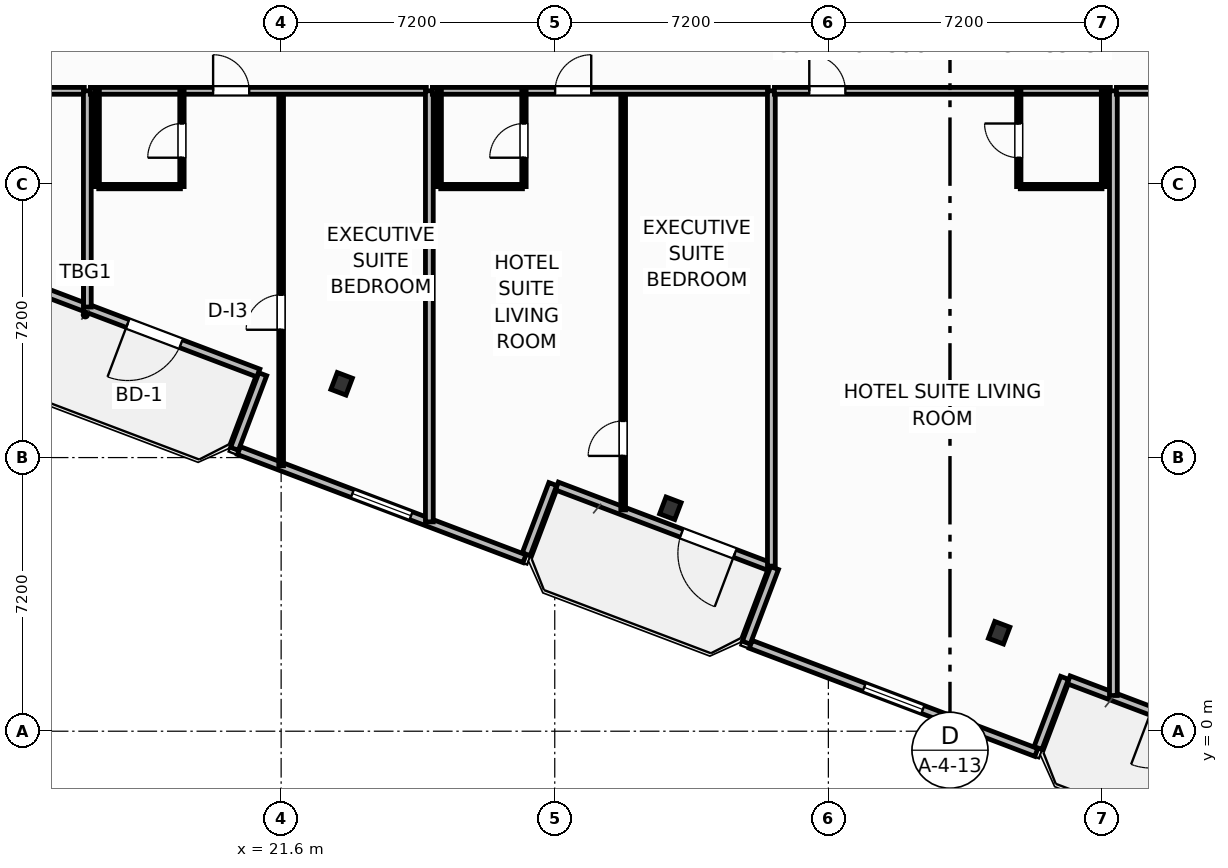
"""IFC4 building model, lengths in metres.
Left out: names, types, materials, properties, quantities, classifications, styles, units other than length and angle.
Written with IfcOpenShell. Run it as: python <this file> out.ifc"""

import sys

from ifc_helpers import new_model, si_unit, direction, frame, frame_2d, origin, origin_2d, place, context, subcontext, project, spatial, rectangle, i_section, extrude, element, fill, save


model = new_model("IFC4")
c1 = context("Model", 3, precision=1e-05, world=origin(), true_north=direction((0.0, 1.0)))
c2 = subcontext(c1, "Body", "Model", "MODEL_VIEW")
j1 = project(units=[si_unit("LENGTHUNIT", "METRE"), si_unit("PLANEANGLEUNIT", "RADIAN")], contexts=[c1])
p1 = place(None, origin())
s1 = spatial("IfcSite", under=j1, at=p1, CompositionType="ELEMENT")
p2 = place(p1, origin())
s2 = spatial("IfcBuilding", under=s1, at=p2, CompositionType="ELEMENT")
p3 = place(p2, frame((0.0, 0.0, 83.6)))
s3 = spatial("IfcBuildingStorey", under=s2, at=p3, CompositionType="ELEMENT", Elevation=83.6)
for number, where, z_axis, x_axis in (
    (1, (23.192, 9.141, 0.0), (0.0, 0.0, 1.0), (0.935, -0.354, 0.0)),
    (2, (31.843, 5.866, 0.0), (0.0, 0.0, 1.0), (0.935, -0.354, 0.0)),
    (3, (40.493, 2.591, 0.0), (0.0, 0.0, 1.0), (0.935, -0.354, 0.0)),
):
    element("IfcColumn", number, at=place(p3, frame(where, z_axis=z_axis, x_axis=x_axis)), inside=s3, PredefinedType="COLUMN", context=c2, shape_type="SweptSolid", body=[
        extrude(i_section(OverallWidth=0.424, OverallDepth=0.474, WebThickness=0.048, FlangeThickness=0.077, FilletRadius=0.025, at=origin_2d()), origin(), (0.0, 0.0, 1.0), 3.7),
    ])
p4 = place(p3, frame((21.0, 9.425, 0.0), z_axis=(0.0, 0.0, 1.0), x_axis=(-0.93521416643, 0.354082565101, 0.0)))
e4 = element("IfcWall", 4, at=p4, inside=s3, PredefinedType="SOLIDWALL", context=c2, shape_type="SweptSolid", body=[
    extrude(rectangle(XDim=6.0, YDim=0.22, at=frame_2d((3.0, 0.0))), origin(), (0.0, 0.0, 1.0), 2.73),
])
p5 = place(p4, frame((2.176, 0.0, 0.0)))
e5 = element("IfcOpeningElement", 5, at=p5, cuts=e4, PredefinedType="OPENING", context=c2, shape_type="SweptSolid", body=[
    extrude(rectangle(XDim=1.5, YDim=2.25, at=frame_2d((0.75, 1.125))), frame((0.0, 0.12, 0.0), z_axis=(0.0, -1.0, 0.0), x_axis=(1.0, 0.0, 0.0)), (0.0, 0.0, 1.0), 0.24),
])
p6 = place(p3, frame((34.468, 4.327, 0.0), z_axis=(0.0, 0.0, 1.0), x_axis=(-0.9352192676, 0.354069091436, 0.0)))
e6 = element("IfcWall", 6, at=p6, inside=s3, PredefinedType="SOLIDWALL", context=c2, shape_type="SweptSolid", body=[
    extrude(rectangle(XDim=6.0, YDim=0.22, at=frame_2d((3.0, 0.0))), origin(), (0.0, 0.0, 1.0), 2.73),
])
p7 = place(p6, frame((0.992, 0.0, 0.0)))
e7 = element("IfcOpeningElement", 7, at=p7, cuts=e6, PredefinedType="OPENING", context=c2, shape_type="SweptSolid", body=[
    extrude(rectangle(XDim=1.5, YDim=2.25, at=frame_2d((0.75, 1.125))), frame((0.0, 0.12, 0.0), z_axis=(0.0, -1.0, 0.0), x_axis=(1.0, 0.0, 0.0)), (0.0, 0.0, 1.0), 0.24),
])
p8 = place(p3, frame((47.935, -0.771, 0.0), z_axis=(0.0, 0.0, 1.0), x_axis=(-0.935227640088, 0.354046976001, 0.0)))
e8 = element("IfcWall", 8, at=p8, inside=s3, PredefinedType="SOLIDWALL", context=c2, shape_type="SweptSolid", body=[
    extrude(rectangle(XDim=6.0, YDim=0.22, at=frame_2d((3.0, 0.0))), origin(), (0.0, 0.0, 1.0), 2.73),
])
p9 = place(p8, frame((2.176, 0.0, 0.0)))
e9 = element("IfcOpeningElement", 9, at=p9, cuts=e8, PredefinedType="OPENING", context=c2, shape_type="SweptSolid", body=[
    extrude(rectangle(XDim=1.5, YDim=2.25, at=frame_2d((0.75, 1.125))), frame((0.0, 0.12, 0.0), z_axis=(0.0, -1.0, 0.0), x_axis=(1.0, 0.0, 0.0)), (0.0, 0.0, 1.0), 0.24),
])
p10 = place(p3, frame((21.116, 9.392, 0.0), z_axis=(0.0, 0.0, 1.0), x_axis=(-0.353988291547, -0.935249854022, 0.0)))
e10 = element("IfcWall", 10, at=p10, inside=s3, PredefinedType="SOLIDWALL", context=c2, shape_type="SweptSolid", body=[
    extrude(rectangle(XDim=2.1, YDim=0.22, at=frame_2d((1.05, 0.0))), origin(), (0.0, 0.0, 1.0), 2.73),
])
p11 = place(p3, frame((20.49, 7.384, 0.0), z_axis=(0.0, 0.0, 1.0), x_axis=(0.935230796934, -0.354038636968, 0.0)))
e11 = element("IfcWall", 11, at=p11, inside=s3, PredefinedType="SOLIDWALL", context=c2, shape_type="SweptSolid", body=[
    extrude(rectangle(XDim=8.035, YDim=0.22, at=frame_2d((4.018, 0.0))), origin(), (0.0, 0.0, 1.0), 2.73),
])
p12 = place(p11, frame((3.192, 0.0, 0.8)))
e12 = element("IfcOpeningElement", 12, at=p12, cuts=e11, PredefinedType="OPENING", context=c2, shape_type="SweptSolid", body=[
    extrude(rectangle(XDim=1.65, YDim=1.65, at=frame_2d((0.825, 0.825))), frame((0.0, 0.12, 0.0), z_axis=(0.0, -1.0, 0.0), x_axis=(1.0, 0.0, 0.0)), (0.0, 0.0, 1.0), 0.24),
])
p13 = place(p3, frame((28.048, 4.656, 0.0), z_axis=(0.0, 0.0, 1.0), x_axis=(0.354128791944, 0.935196663123, 0.0)))
e13 = element("IfcWall", 13, at=p13, inside=s3, PredefinedType="SOLIDWALL", context=c2, shape_type="SweptSolid", body=[
    extrude(rectangle(XDim=1.975, YDim=0.22, at=frame_2d((0.988, 0.0))), origin(), (0.0, 0.0, 1.0), 2.73),
])
p14 = place(p3, frame((34.583, 4.294, 0.0), z_axis=(0.0, 0.0, 1.0), x_axis=(-0.354128469405, -0.935196785258, 0.0)))
e14 = element("IfcWall", 14, at=p14, inside=s3, PredefinedType="SOLIDWALL", context=c2, shape_type="SweptSolid", body=[
    extrude(rectangle(XDim=2.1, YDim=0.22, at=frame_2d((1.05, 0.0))), origin(), (0.0, 0.0, 1.0), 2.73),
])
p15 = place(p3, frame((33.957, 2.286, 0.0), z_axis=(0.0, 0.0, 1.0), x_axis=(0.935220736163, -0.354065212427, 0.0)))
e15 = element("IfcWall", 15, at=p15, inside=s3, PredefinedType="SOLIDWALL", context=c2, shape_type="SweptSolid", body=[
    extrude(rectangle(XDim=8.035, YDim=0.22, at=frame_2d((4.018, 0.0))), origin(), (0.0, 0.0, 1.0), 2.73),
])
p16 = place(p15, frame((3.192, 0.0, 0.8)))
e16 = element("IfcOpeningElement", 16, at=p16, cuts=e15, PredefinedType="OPENING", context=c2, shape_type="SweptSolid", body=[
    extrude(rectangle(XDim=1.65, YDim=1.65, at=frame_2d((0.825, 0.825))), frame((0.0, 0.12, 0.0), z_axis=(0.0, -1.0, 0.0), x_axis=(1.0, 0.0, 0.0)), (0.0, 0.0, 1.0), 0.24),
])
p17 = place(p3, frame((41.516, -0.442, 0.0), z_axis=(0.0, 0.0, 1.0), x_axis=(0.354061611705, 0.935222099352, 0.0)))
e17 = element("IfcWall", 17, at=p17, inside=s3, PredefinedType="SOLIDWALL", context=c2, shape_type="SweptSolid", body=[
    extrude(rectangle(XDim=1.975, YDim=0.22, at=frame_2d((0.987, 0.0))), origin(), (0.0, 0.0, 1.0), 2.73),
])
p18 = place(p3, frame((1.58, 16.85, 0.0), z_axis=(0.0, 0.0, 1.0), x_axis=(1.0, 0.0, 0.0)))
e18 = element("IfcWall", 18, at=p18, inside=s3, PredefinedType="PARTITIONING", context=c2, shape_type="SweptSolid", body=[
    extrude(rectangle(XDim=14.84, YDim=0.18, at=frame_2d((7.42, 0.0))), origin(), (0.0, 0.0, 1.0), 3.45),
])
p19 = place(p18, frame((11.705, 0.0, 0.0)))
e19 = element("IfcOpeningElement", 19, at=p19, cuts=e18, PredefinedType="OPENING", context=c2, shape_type="SweptSolid", body=[
    extrude(rectangle(XDim=0.95, YDim=2.15, at=frame_2d((0.475, 1.075))), frame((0.0, 0.1, 0.0), z_axis=(0.0, -1.0, 0.0), x_axis=(1.0, 0.0, 0.0)), (0.0, 0.0, 1.0), 0.2),
])
p20 = place(p3, frame((16.5, 11.161, 0.0), z_axis=(0.0, 0.0, 1.0), x_axis=(0.0, 1.0, 0.0)))
e20 = element("IfcWall", 20, at=p20, inside=s3, PredefinedType="PARTITIONING", context=c2, shape_type="SweptSolid", body=[
    extrude(rectangle(XDim=5.689, YDim=0.205, at=frame_2d((2.844, 0.0))), origin(), (0.0, 0.0, 1.0), 3.45),
])
p21 = place(p3, frame((21.6, 6.985, 0.0), z_axis=(0.0, 0.0, 1.0), x_axis=(0.0, 1.0, 0.0)))
e21 = element("IfcWall", 21, at=p21, inside=s3, PredefinedType="PARTITIONING", context=c2, shape_type="SweptSolid", body=[
    extrude(rectangle(XDim=9.865, YDim=0.125, at=frame_2d((4.933, 0.0))), origin(), (0.0, 0.0, 1.0), 3.45),
])
p22 = place(p21, frame((3.578, 0.0, 0.0)))
e22 = element("IfcOpeningElement", 22, at=p22, cuts=e21, PredefinedType="OPENING", context=c2, shape_type="SweptSolid", body=[
    extrude(rectangle(XDim=0.92, YDim=2.05, at=frame_2d((0.46, 1.025))), frame((0.0, 0.073, 0.0), z_axis=(0.0, -1.0, 0.0), x_axis=(1.0, 0.0, 0.0)), (0.0, 0.0, 1.0), 0.145),
])
p23 = place(p3, frame((16.58, 16.85, 0.0), z_axis=(0.0, 0.0, 1.0), x_axis=(1.0, 0.0, 0.0)))
e23 = element("IfcWall", 23, at=p23, inside=s3, PredefinedType="PARTITIONING", context=c2, shape_type="SweptSolid", body=[
    extrude(rectangle(XDim=8.84, YDim=0.18, at=frame_2d((4.42, 0.0))), origin(), (0.0, 0.0, 1.0), 3.45),
])
p24 = place(p23, frame((3.23, 0.0, 0.0)))
e24 = element("IfcOpeningElement", 24, at=p24, cuts=e23, PredefinedType="OPENING", context=c2, shape_type="SweptSolid", body=[
    extrude(rectangle(XDim=0.95, YDim=2.15, at=frame_2d((0.475, 1.075))), frame((0.0, 0.1, 0.0), z_axis=(0.0, -1.0, 0.0), x_axis=(1.0, 0.0, 0.0)), (0.0, 0.0, 1.0), 0.2),
])
p25 = place(p3, frame((16.8, 14.33, 0.0), z_axis=(0.0, 0.0, 1.0), x_axis=(1.0, 0.0, 0.0)))
e25 = element("IfcWall", 25, at=p25, inside=s3, PredefinedType="PARTITIONING", context=c2, shape_type="SweptSolid", body=[
    extrude(rectangle(XDim=2.15, YDim=0.115, at=frame_2d((1.075, 0.0))), origin(), (0.0, 0.0, 1.0), 3.45),
])
p26 = place(p3, frame((18.99, 14.33, 0.0), z_axis=(0.0, 0.0, 1.0), x_axis=(0.0, 1.0, 0.0)))
e26 = element("IfcWall", 26, at=p26, inside=s3, PredefinedType="PARTITIONING", context=c2, shape_type="SweptSolid", body=[
    extrude(rectangle(XDim=2.52, YDim=0.115, at=frame_2d((1.26, 0.0))), origin(), (0.0, 0.0, 1.0), 3.45),
])
p27 = place(p26, frame((0.76, 0.0, 0.0)))
e27 = element("IfcOpeningElement", 27, at=p27, cuts=e26, PredefinedType="OPENING", context=c2, shape_type="SweptSolid", body=[
    extrude(rectangle(XDim=0.9, YDim=2.05, at=frame_2d((0.45, 1.025))), frame((0.0, 0.067, 0.0), z_axis=(0.0, -1.0, 0.0), x_axis=(1.0, 0.0, 0.0)), (0.0, 0.0, 1.0), 0.135),
])
p28 = place(p3, frame((16.76, 14.33, 0.0), z_axis=(0.0, 0.0, 1.0), x_axis=(0.0, 1.0, 0.0)))
e28 = element("IfcWall", 28, at=p28, inside=s3, PredefinedType="PARTITIONING", context=c2, shape_type="SweptSolid", body=[
    extrude(rectangle(XDim=2.52, YDim=0.115, at=frame_2d((1.26, 0.0))), origin(), (0.0, 0.0, 1.0), 3.45),
])
p29 = place(p3, frame((25.5, 5.509, 0.0), z_axis=(0.0, 0.0, 1.0), x_axis=(0.0, 1.0, 0.0)))
e29 = element("IfcWall", 29, at=p29, inside=s3, PredefinedType="PARTITIONING", context=c2, shape_type="SweptSolid", body=[
    extrude(rectangle(XDim=11.342, YDim=0.205, at=frame_2d((5.671, 0.0))), origin(), (0.0, 0.0, 1.0), 3.45),
])
p30 = place(p3, frame((30.6, 5.823, 0.0), z_axis=(0.0, 0.0, 1.0), x_axis=(0.0, 1.0, 0.0)))
e30 = element("IfcWall", 30, at=p30, inside=s3, PredefinedType="PARTITIONING", context=c2, shape_type="SweptSolid", body=[
    extrude(rectangle(XDim=11.027, YDim=0.125, at=frame_2d((5.513, 0.0))), origin(), (0.0, 0.0, 1.0), 3.45),
])
p31 = place(p30, frame((1.42, 0.0, 0.0)))
e31 = element("IfcOpeningElement", 31, at=p31, cuts=e30, PredefinedType="OPENING", context=c2, shape_type="SweptSolid", body=[
    extrude(rectangle(XDim=0.92, YDim=2.05, at=frame_2d((0.46, 1.025))), frame((0.0, 0.073, 0.0), z_axis=(0.0, -1.0, 0.0), x_axis=(1.0, 0.0, 0.0)), (0.0, 0.0, 1.0), 0.145),
])
p32 = place(p3, frame((25.58, 16.85, 0.0), z_axis=(0.0, 0.0, 1.0), x_axis=(1.0, 0.0, 0.0)))
e32 = element("IfcWall", 32, at=p32, inside=s3, PredefinedType="PARTITIONING", context=c2, shape_type="SweptSolid", body=[
    extrude(rectangle(XDim=8.84, YDim=0.18, at=frame_2d((4.42, 0.0))), origin(), (0.0, 0.0, 1.0), 3.45),
])
p33 = place(p32, frame((3.23, 0.0, 0.0)))
e33 = element("IfcOpeningElement", 33, at=p33, cuts=e32, PredefinedType="OPENING", context=c2, shape_type="SweptSolid", body=[
    extrude(rectangle(XDim=0.95, YDim=2.15, at=frame_2d((0.475, 1.075))), frame((0.0, 0.1, 0.0), z_axis=(0.0, -1.0, 0.0), x_axis=(1.0, 0.0, 0.0)), (0.0, 0.0, 1.0), 0.2),
])
p34 = place(p3, frame((25.8, 14.33, 0.0), z_axis=(0.0, 0.0, 1.0), x_axis=(1.0, 0.0, 0.0)))
e34 = element("IfcWall", 34, at=p34, inside=s3, PredefinedType="PARTITIONING", context=c2, shape_type="SweptSolid", body=[
    extrude(rectangle(XDim=2.15, YDim=0.115, at=frame_2d((1.075, 0.0))), origin(), (0.0, 0.0, 1.0), 3.45),
])
p35 = place(p3, frame((27.99, 14.33, 0.0), z_axis=(0.0, 0.0, 1.0), x_axis=(0.0, 1.0, 0.0)))
e35 = element("IfcWall", 35, at=p35, inside=s3, PredefinedType="PARTITIONING", context=c2, shape_type="SweptSolid", body=[
    extrude(rectangle(XDim=2.52, YDim=0.115, at=frame_2d((1.26, 0.0))), origin(), (0.0, 0.0, 1.0), 3.45),
])
p36 = place(p35, frame((0.76, 0.0, 0.0)))
e36 = element("IfcOpeningElement", 36, at=p36, cuts=e35, PredefinedType="OPENING", context=c2, shape_type="SweptSolid", body=[
    extrude(rectangle(XDim=0.9, YDim=2.05, at=frame_2d((0.45, 1.025))), frame((0.0, 0.067, 0.0), z_axis=(0.0, -1.0, 0.0), x_axis=(1.0, 0.0, 0.0)), (0.0, 0.0, 1.0), 0.135),
])
p37 = place(p3, frame((25.76, 14.33, 0.0), z_axis=(0.0, 0.0, 1.0), x_axis=(0.0, 1.0, 0.0)))
e37 = element("IfcWall", 37, at=p37, inside=s3, PredefinedType="PARTITIONING", context=c2, shape_type="SweptSolid", body=[
    extrude(rectangle(XDim=2.52, YDim=0.115, at=frame_2d((1.26, 0.0))), origin(), (0.0, 0.0, 1.0), 3.45),
])
p38 = place(p3, frame((34.5, 4.344, 0.0), z_axis=(0.0, 0.0, 1.0), x_axis=(0.0, 1.0, 0.0)))
e38 = element("IfcWall", 38, at=p38, inside=s3, PredefinedType="PARTITIONING", context=c2, shape_type="SweptSolid", body=[
    extrude(rectangle(XDim=12.506, YDim=0.205, at=frame_2d((6.253, 0.0))), origin(), (0.0, 0.0, 1.0), 3.45),
])
p39 = place(p3, frame((34.58, 16.85, 0.0), z_axis=(0.0, 0.0, 1.0), x_axis=(1.0, 0.0, 0.0)))
e39 = element("IfcWall", 39, at=p39, inside=s3, PredefinedType="PARTITIONING", context=c2, shape_type="SweptSolid", body=[
    extrude(rectangle(XDim=8.84, YDim=0.18, at=frame_2d((4.42, 0.0))), origin(), (0.0, 0.0, 1.0), 3.45),
])
p40 = place(p39, frame((0.918, 0.0, 0.0)))
e40 = element("IfcOpeningElement", 40, at=p40, cuts=e39, PredefinedType="OPENING", context=c2, shape_type="SweptSolid", body=[
    extrude(rectangle(XDim=0.95, YDim=2.15, at=frame_2d((0.475, 1.075))), frame((0.0, 0.1, 0.0), z_axis=(0.0, -1.0, 0.0), x_axis=(1.0, 0.0, 0.0)), (0.0, 0.0, 1.0), 0.2),
])
p41 = place(p3, frame((41.05, 14.33, 0.0), z_axis=(0.0, 0.0, 1.0), x_axis=(1.0, 0.0, 0.0)))
e41 = element("IfcWall", 41, at=p41, inside=s3, PredefinedType="PARTITIONING", context=c2, shape_type="SweptSolid", body=[
    extrude(rectangle(XDim=2.15, YDim=0.115, at=frame_2d((1.075, 0.0))), origin(), (0.0, 0.0, 1.0), 3.45),
])
p42 = place(p3, frame((41.01, 14.33, 0.0), z_axis=(0.0, 0.0, 1.0), x_axis=(0.0, 1.0, 0.0)))
e42 = element("IfcWall", 42, at=p42, inside=s3, PredefinedType="PARTITIONING", context=c2, shape_type="SweptSolid", body=[
    extrude(rectangle(XDim=2.52, YDim=0.115, at=frame_2d((1.26, 0.0))), origin(), (0.0, 0.0, 1.0), 3.45),
])
p43 = place(p42, frame((0.76, 0.0, 0.0)))
e43 = element("IfcOpeningElement", 43, at=p43, cuts=e42, PredefinedType="OPENING", context=c2, shape_type="SweptSolid", body=[
    extrude(rectangle(XDim=0.9, YDim=2.05, at=frame_2d((0.45, 1.025))), frame((0.0, 0.067, 0.0), z_axis=(0.0, -1.0, 0.0), x_axis=(1.0, 0.0, 0.0)), (0.0, 0.0, 1.0), 0.135),
])
p44 = place(p3, frame((43.24, 14.33, 0.0), z_axis=(0.0, 0.0, 1.0), x_axis=(0.0, 1.0, 0.0)))
e44 = element("IfcWall", 44, at=p44, inside=s3, PredefinedType="PARTITIONING", context=c2, shape_type="SweptSolid", body=[
    extrude(rectangle(XDim=2.52, YDim=0.115, at=frame_2d((1.26, 0.0))), origin(), (0.0, 0.0, 1.0), 2.58),
])
p45 = place(p3, frame((43.5, 0.939, 0.0), z_axis=(0.0, 0.0, 1.0), x_axis=(0.0, 1.0, 0.0)))
e45 = element("IfcWall", 45, at=p45, inside=s3, PredefinedType="PARTITIONING", context=c2, shape_type="SweptSolid", body=[
    extrude(rectangle(XDim=15.911, YDim=0.205, at=frame_2d((7.955, 0.0))), origin(), (0.0, 0.0, 1.0), 2.58),
])
p46 = place(p3, frame((43.58, 16.85, 0.0), z_axis=(0.0, 0.0, 1.0), x_axis=(1.0, 0.0, 0.0)))
e46 = element("IfcWall", 46, at=p46, inside=s3, PredefinedType="PARTITIONING", context=c2, shape_type="SweptSolid", body=[
    extrude(rectangle(XDim=8.84, YDim=0.18, at=frame_2d((4.42, 0.0))), origin(), (0.0, 0.0, 1.0), 3.45),
])
p47 = place(p46, frame((0.918, 0.0, 0.0)))
e47 = element("IfcOpeningElement", 47, at=p47, cuts=e46, PredefinedType="OPENING", context=c2, shape_type="SweptSolid", body=[
    extrude(rectangle(XDim=0.95, YDim=2.15, at=frame_2d((0.475, 1.075))), frame((0.0, 0.1, 0.0), z_axis=(0.0, -1.0, 0.0), x_axis=(1.0, 0.0, 0.0)), (0.0, 0.0, 1.0), 0.2),
])
p48 = place(p5, origin())
e48 = element("IfcDoor", 48, at=p48, inside=s3, OperationType="SINGLE_SWING_RIGHT", PredefinedType="DOOR", context=c2, shape_type="SweptSolid", body=[
    extrude(rectangle(XDim=1.5, YDim=2.25, at=frame_2d((0.75, 1.125))), frame((0.0, 0.025, 0.0), z_axis=(0.0, -1.0, 0.0), x_axis=(1.0, 0.0, 0.0)), (0.0, 0.0, 1.0), 0.05),
])
fill(e5, e48)
p49 = place(p7, origin())
e49 = element("IfcDoor", 49, at=p49, inside=s3, OperationType="SINGLE_SWING_LEFT", PredefinedType="DOOR", context=c2, shape_type="SweptSolid", body=[
    extrude(rectangle(XDim=1.5, YDim=2.25, at=frame_2d((0.75, 1.125))), frame((0.0, 0.025, 0.0), z_axis=(0.0, -1.0, 0.0), x_axis=(1.0, 0.0, 0.0)), (0.0, 0.0, 1.0), 0.05),
])
fill(e7, e49)
p50 = place(p12, origin())
e50 = element("IfcWindow", 50, at=p50, inside=s3, PartitioningType="SINGLE_PANEL", PredefinedType="WINDOW", context=c2, shape_type="SweptSolid", body=[
    extrude(rectangle(XDim=1.65, YDim=1.65, at=frame_2d((0.825, 0.825))), frame((0.0, 0.03, 0.0), z_axis=(0.0, -1.0, 0.0), x_axis=(1.0, 0.0, 0.0)), (0.0, 0.0, 1.0), 0.06),
])
fill(e12, e50)
p51 = place(p16, origin())
e51 = element("IfcWindow", 51, at=p51, inside=s3, PartitioningType="SINGLE_PANEL", PredefinedType="WINDOW", context=c2, shape_type="SweptSolid", body=[
    extrude(rectangle(XDim=1.65, YDim=1.65, at=frame_2d((0.825, 0.825))), frame((0.0, 0.03, 0.0), z_axis=(0.0, -1.0, 0.0), x_axis=(1.0, 0.0, 0.0)), (0.0, 0.0, 1.0), 0.06),
])
fill(e16, e51)
p52 = place(p22, origin())
e52 = element("IfcDoor", 52, at=p52, inside=s3, OperationType="SINGLE_SWING_LEFT", PredefinedType="DOOR", context=c2, shape_type="SweptSolid", body=[
    extrude(rectangle(XDim=0.92, YDim=2.05, at=frame_2d((0.46, 1.025))), frame((0.0, 0.025, 0.0), z_axis=(0.0, -1.0, 0.0), x_axis=(1.0, 0.0, 0.0)), (0.0, 0.0, 1.0), 0.05),
])
fill(e22, e52)
p53 = place(p24, origin())
e53 = element("IfcDoor", 53, at=p53, inside=s3, OperationType="SINGLE_SWING_LEFT", PredefinedType="DOOR", context=c2, shape_type="SweptSolid", body=[
    extrude(rectangle(XDim=0.95, YDim=2.15, at=frame_2d((0.475, 1.075))), frame((0.0, 0.025, 0.0), z_axis=(0.0, -1.0, 0.0), x_axis=(1.0, 0.0, 0.0)), (0.0, 0.0, 1.0), 0.05),
])
fill(e24, e53)
p54 = place(p27, origin())
e54 = element("IfcDoor", 54, at=p54, inside=s3, OperationType="SINGLE_SWING_LEFT", PredefinedType="DOOR", context=c2, shape_type="SweptSolid", body=[
    extrude(rectangle(XDim=0.9, YDim=2.05, at=frame_2d((0.45, 1.025))), frame((0.0, 0.025, 0.0), z_axis=(0.0, -1.0, 0.0), x_axis=(1.0, 0.0, 0.0)), (0.0, 0.0, 1.0), 0.05),
])
fill(e27, e54)
p55 = place(p31, origin())
e55 = element("IfcDoor", 55, at=p55, inside=s3, OperationType="SINGLE_SWING_LEFT", PredefinedType="DOOR", context=c2, shape_type="SweptSolid", body=[
    extrude(rectangle(XDim=0.92, YDim=2.05, at=frame_2d((0.46, 1.025))), frame((0.0, 0.025, 0.0), z_axis=(0.0, -1.0, 0.0), x_axis=(1.0, 0.0, 0.0)), (0.0, 0.0, 1.0), 0.05),
])
fill(e31, e55)
p56 = place(p33, origin())
e56 = element("IfcDoor", 56, at=p56, inside=s3, OperationType="SINGLE_SWING_RIGHT", PredefinedType="DOOR", context=c2, shape_type="SweptSolid", body=[
    extrude(rectangle(XDim=0.95, YDim=2.15, at=frame_2d((0.475, 1.075))), frame((0.0, 0.025, 0.0), z_axis=(0.0, -1.0, 0.0), x_axis=(1.0, 0.0, 0.0)), (0.0, 0.0, 1.0), 0.05),
])
fill(e33, e56)
p57 = place(p36, origin())
e57 = element("IfcDoor", 57, at=p57, inside=s3, OperationType="SINGLE_SWING_LEFT", PredefinedType="DOOR", context=c2, shape_type="SweptSolid", body=[
    extrude(rectangle(XDim=0.9, YDim=2.05, at=frame_2d((0.45, 1.025))), frame((0.0, 0.025, 0.0), z_axis=(0.0, -1.0, 0.0), x_axis=(1.0, 0.0, 0.0)), (0.0, 0.0, 1.0), 0.05),
])
fill(e36, e57)
p58 = place(p40, origin())
e58 = element("IfcDoor", 58, at=p58, inside=s3, OperationType="SINGLE_SWING_LEFT", PredefinedType="DOOR", context=c2, shape_type="SweptSolid", body=[
    extrude(rectangle(XDim=0.95, YDim=2.15, at=frame_2d((0.475, 1.075))), frame((0.0, 0.025, 0.0), z_axis=(0.0, -1.0, 0.0), x_axis=(1.0, 0.0, 0.0)), (0.0, 0.0, 1.0), 0.05),
])
fill(e40, e58)
p59 = place(p43, origin())
e59 = element("IfcDoor", 59, at=p59, inside=s3, OperationType="SINGLE_SWING_RIGHT", PredefinedType="DOOR", context=c2, shape_type="SweptSolid", body=[
    extrude(rectangle(XDim=0.9, YDim=2.05, at=frame_2d((0.45, 1.025))), frame((0.0, 0.025, 0.0), z_axis=(0.0, -1.0, 0.0), x_axis=(1.0, 0.0, 0.0)), (0.0, 0.0, 1.0), 0.05),
])
fill(e43, e59)
save(model, sys.argv[1])
